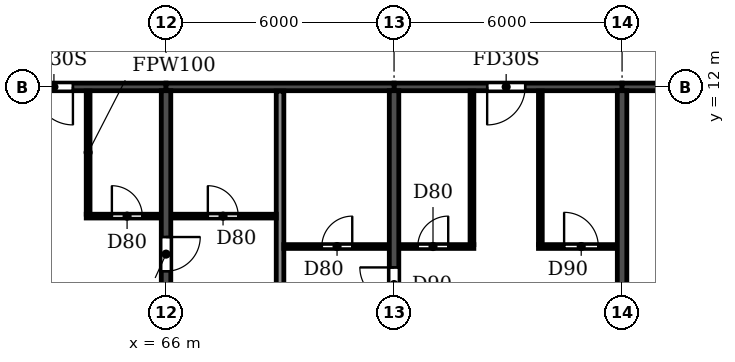
"""IFC4 building model, lengths in metres.
Left out: names, types, materials, properties, quantities, classifications, styles, units other than length and angle.
Written with IfcOpenShell. Run it as: python <this file> out.ifc"""

import sys

from ifc_helpers import new_model, si_unit, direction, frame, frame_2d, origin, place, context, subcontext, project, spatial, rectangle, extrude, element, fill, save


model = new_model("IFC4")
c1 = context("Model", 3, precision=1e-05, world=origin(), true_north=direction((0.0, 1.0)))
c2 = subcontext(c1, "Body", "Model", "MODEL_VIEW")
j1 = project(units=[si_unit("LENGTHUNIT", "METRE"), si_unit("PLANEANGLEUNIT", "RADIAN")], contexts=[c1])
p1 = place(None, origin())
s1 = spatial("IfcSite", under=j1, at=p1, CompositionType="ELEMENT")
p2 = place(p1, origin())
s2 = spatial("IfcBuilding", under=s1, at=p2, CompositionType="ELEMENT")
p3 = place(p2, frame((0.0, 0.0, 191.7)))
s3 = spatial("IfcBuildingStorey", under=s2, at=p3, CompositionType="ELEMENT", Elevation=191.7)
p4 = place(p3, frame((66.0, 0.2, 0.0), z_axis=(0.0, 0.0, 1.0), x_axis=(0.0, 1.0, 0.0)))
e1 = element("IfcWall", 1, at=p4, inside=s3, PredefinedType="SHEAR", context=c2, shape_type="SweptSolid", body=[
    extrude(rectangle(XDim=11.7, YDim=0.25, at=frame_2d((5.85, 0.0))), origin(), (0.0, 0.0, 1.0), 3.08),
])
p5 = place(p4, frame((6.95, 0.0, 0.0)))
e2 = element("IfcOpeningElement", 2, at=p5, cuts=e1, PredefinedType="OPENING", context=c2, shape_type="SweptSolid", body=[
    extrude(rectangle(XDim=0.9, YDim=2.1, at=frame_2d((0.45, 1.05))), frame((0.0, 0.135, 0.0), z_axis=(0.0, -1.0, 0.0), x_axis=(1.0, 0.0, 0.0)), (0.0, 0.0, 1.0), 0.27),
])
p6 = place(p3, frame((72.0, 0.2, 0.0), z_axis=(0.0, 0.0, 1.0), x_axis=(0.0, 1.0, 0.0)))
e3 = element("IfcWall", 3, at=p6, inside=s3, PredefinedType="SHEAR", context=c2, shape_type="SweptSolid", body=[
    extrude(rectangle(XDim=11.7, YDim=0.25, at=frame_2d((5.85, 0.0))), origin(), (0.0, 0.0, 1.0), 3.08),
])
p7 = place(p6, frame((6.15, 0.0, 0.0)))
e4 = element("IfcOpeningElement", 4, at=p7, cuts=e3, PredefinedType="OPENING", context=c2, shape_type="SweptSolid", body=[
    extrude(rectangle(XDim=0.9, YDim=2.1, at=frame_2d((0.45, 1.05))), frame((0.0, 0.135, 0.0), z_axis=(0.0, -1.0, 0.0), x_axis=(1.0, 0.0, 0.0)), (0.0, 0.0, 1.0), 0.27),
])
p8 = place(p3, frame((78.0, 0.2, 0.0), z_axis=(0.0, 0.0, 1.0), x_axis=(0.0, 1.0, 0.0)))
e5 = element("IfcWall", 5, at=p8, inside=s3, PredefinedType="SHEAR", context=c2, shape_type="SweptSolid", body=[
    extrude(rectangle(XDim=11.7, YDim=0.25, at=frame_2d((5.85, 0.0))), origin(), (0.0, 0.0, 1.0), 3.08),
])
p9 = place(p3, frame((60.0, 12.0, 0.0), z_axis=(0.0, 0.0, 1.0), x_axis=(1.0, 0.0, 0.0)))
e6 = element("IfcWall", 6, at=p9, inside=s3, PredefinedType="SHEAR", context=c2, shape_type="SweptSolid", body=[
    extrude(rectangle(XDim=6.0, YDim=0.2, at=frame_2d((3.0, 0.0))), origin(), (0.0, 0.0, 1.0), 2.48),
])
p10 = place(p9, frame((2.55, 0.0, 0.0)))
e7 = element("IfcOpeningElement", 7, at=p10, cuts=e6, PredefinedType="OPENING", context=c2, shape_type="SweptSolid", body=[
    extrude(rectangle(XDim=1.0, YDim=2.1, at=frame_2d((0.5, 1.05))), frame((0.0, 0.11, 0.0), z_axis=(0.0, -1.0, 0.0), x_axis=(1.0, 0.0, 0.0)), (0.0, 0.0, 1.0), 0.22),
])
p11 = place(p3, frame((66.0, 12.0, 0.0), z_axis=(0.0, 0.0, 1.0), x_axis=(1.0, 0.0, 0.0)))
e8 = element("IfcWall", 8, at=p11, inside=s3, PredefinedType="SHEAR", context=c2, shape_type="SweptSolid", body=[
    extrude(rectangle(XDim=6.0, YDim=0.2, at=frame_2d((3.0, 0.0))), origin(), (0.0, 0.0, 1.0), 2.48),
])
p12 = place(p3, frame((72.0, 12.0, 0.0), z_axis=(0.0, 0.0, 1.0), x_axis=(1.0, 0.0, 0.0)))
e9 = element("IfcWall", 9, at=p12, inside=s3, PredefinedType="SHEAR", context=c2, shape_type="SweptSolid", body=[
    extrude(rectangle(XDim=6.0, YDim=0.2, at=frame_2d((3.0, 0.0))), origin(), (0.0, 0.0, 1.0), 2.48),
])
p13 = place(p12, frame((2.45, 0.0, 0.0)))
e10 = element("IfcOpeningElement", 10, at=p13, cuts=e9, PredefinedType="OPENING", context=c2, shape_type="SweptSolid", body=[
    extrude(rectangle(XDim=1.0, YDim=2.1, at=frame_2d((0.5, 1.05))), frame((0.0, 0.11, 0.0), z_axis=(0.0, -1.0, 0.0), x_axis=(1.0, 0.0, 0.0)), (0.0, 0.0, 1.0), 0.22),
])
p14 = place(p3, frame((78.0, 12.0, 0.0), z_axis=(0.0, 0.0, 1.0), x_axis=(1.0, 0.0, 0.0)))
e11 = element("IfcWall", 11, at=p14, inside=s3, PredefinedType="SHEAR", context=c2, shape_type="SweptSolid", body=[
    extrude(rectangle(XDim=5.8, YDim=0.2, at=frame_2d((2.9, 0.0))), origin(), (0.0, 0.0, 1.0), 2.48),
])
p15 = place(p14, frame((2.5, 0.0, 0.0)))
e12 = element("IfcOpeningElement", 12, at=p15, cuts=e11, PredefinedType="OPENING", context=c2, shape_type="SweptSolid", body=[
    extrude(rectangle(XDim=1.0, YDim=2.1, at=frame_2d((0.5, 1.05))), frame((0.0, 0.11, 0.0), z_axis=(0.0, -1.0, 0.0), x_axis=(1.0, 0.0, 0.0)), (0.0, 0.0, 1.0), 0.22),
])
p16 = place(p3, frame((69.0, 0.06, 0.0), z_axis=(0.0, 0.0, 1.0), x_axis=(0.0, 1.0, 0.0)))
e13 = element("IfcWall", 13, at=p16, inside=s3, PredefinedType="PARTITIONING", context=c2, shape_type="SweptSolid", body=[
    extrude(rectangle(XDim=11.83, YDim=0.2, at=frame_2d((5.915, 0.0))), origin(), (0.0, 0.0, 1.0), 3.08),
])
p17 = place(p3, frame((69.1, 7.8, 0.0), z_axis=(0.0, 0.0, 1.0), x_axis=(1.0, 0.0, 0.0)))
e14 = element("IfcWall", 14, at=p17, inside=s3, PredefinedType="PARTITIONING", context=c2, shape_type="SweptSolid", body=[
    extrude(rectangle(XDim=2.765, YDim=0.1, at=frame_2d((1.382, 0.0))), origin(), (0.0, 0.0, 1.0), 3.08),
])
p18 = place(p17, frame((1.0, 0.0, 0.0)))
e15 = element("IfcOpeningElement", 15, at=p18, cuts=e14, PredefinedType="OPENING", context=c2, shape_type="SweptSolid", body=[
    extrude(rectangle(XDim=0.8, YDim=2.1, at=frame_2d((0.4, 1.05))), frame((0.0, 0.06, 0.0), z_axis=(0.0, -1.0, 0.0), x_axis=(1.0, 0.0, 0.0)), (0.0, 0.0, 1.0), 0.12),
])
p19 = place(p3, frame((72.135, 7.8, 0.0), z_axis=(0.0, 0.0, 1.0), x_axis=(1.0, 0.0, 0.0)))
e16 = element("IfcWall", 16, at=p19, inside=s3, PredefinedType="PARTITIONING", context=c2, shape_type="SweptSolid", body=[
    extrude(rectangle(XDim=1.965, YDim=0.1, at=frame_2d((0.982, 0.0))), origin(), (0.0, 0.0, 1.0), 3.08),
])
p20 = place(p19, frame((0.49, 0.0, 0.0)))
e17 = element("IfcOpeningElement", 17, at=p20, cuts=e16, PredefinedType="OPENING", context=c2, shape_type="SweptSolid", body=[
    extrude(rectangle(XDim=0.8, YDim=2.1, at=frame_2d((0.4, 1.05))), frame((0.0, 0.06, 0.0), z_axis=(0.0, -1.0, 0.0), x_axis=(1.0, 0.0, 0.0)), (0.0, 0.0, 1.0), 0.12),
])
p21 = place(p3, frame((75.8, 7.8, 0.0), z_axis=(0.0, 0.0, 1.0), x_axis=(1.0, 0.0, 0.0)))
e18 = element("IfcWall", 18, at=p21, inside=s3, PredefinedType="PARTITIONING", context=c2, shape_type="SweptSolid", body=[
    extrude(rectangle(XDim=2.065, YDim=0.1, at=frame_2d((1.032, 0.0))), origin(), (0.0, 0.0, 1.0), 3.08),
])
p22 = place(p21, frame((0.675, 0.0, 0.0)))
e19 = element("IfcOpeningElement", 19, at=p22, cuts=e18, PredefinedType="OPENING", context=c2, shape_type="SweptSolid", body=[
    extrude(rectangle(XDim=0.9, YDim=2.1, at=frame_2d((0.45, 1.05))), frame((0.0, 0.06, 0.0), z_axis=(0.0, -1.0, 0.0), x_axis=(1.0, 0.0, 0.0)), (0.0, 0.0, 1.0), 0.12),
])
p23 = place(p3, frame((63.9, 8.6, 0.0), z_axis=(0.0, 0.0, 1.0), x_axis=(1.0, 0.0, 0.0)))
e20 = element("IfcWall", 20, at=p23, inside=s3, PredefinedType="PARTITIONING", context=c2, shape_type="SweptSolid", body=[
    extrude(rectangle(XDim=1.965, YDim=0.1, at=frame_2d((0.982, 0.0))), origin(), (0.0, 0.0, 1.0), 3.08),
])
p24 = place(p23, frame((0.675, 0.0, 0.0)))
e21 = element("IfcOpeningElement", 21, at=p24, cuts=e20, PredefinedType="OPENING", context=c2, shape_type="SweptSolid", body=[
    extrude(rectangle(XDim=0.8, YDim=2.1, at=frame_2d((0.4, 1.05))), frame((0.0, 0.06, 0.0), z_axis=(0.0, -1.0, 0.0), x_axis=(1.0, 0.0, 0.0)), (0.0, 0.0, 1.0), 0.12),
])
p25 = place(p3, frame((66.135, 8.6, 0.0), z_axis=(0.0, 0.0, 1.0), x_axis=(1.0, 0.0, 0.0)))
e22 = element("IfcWall", 22, at=p25, inside=s3, PredefinedType="PARTITIONING", context=c2, shape_type="SweptSolid", body=[
    extrude(rectangle(XDim=2.765, YDim=0.1, at=frame_2d((1.382, 0.0))), origin(), (0.0, 0.0, 1.0), 3.08),
])
p26 = place(p25, frame((0.965, 0.0, 0.0)))
e23 = element("IfcOpeningElement", 23, at=p26, cuts=e22, PredefinedType="OPENING", context=c2, shape_type="SweptSolid", body=[
    extrude(rectangle(XDim=0.8, YDim=2.1, at=frame_2d((0.4, 1.05))), frame((0.0, 0.06, 0.0), z_axis=(0.0, -1.0, 0.0), x_axis=(1.0, 0.0, 0.0)), (0.0, 0.0, 1.0), 0.12),
])
p27 = place(p3, frame((63.95, 8.65, 0.0), z_axis=(0.0, 0.0, 1.0), x_axis=(0.0, 1.0, 0.0)))
e24 = element("IfcWall", 24, at=p27, inside=s3, PredefinedType="PARTITIONING", context=c2, shape_type="SweptSolid", body=[
    extrude(rectangle(XDim=3.24, YDim=0.1, at=frame_2d((1.62, 0.0))), origin(), (0.0, 0.0, 1.0), 3.08),
])
for number, where, z_axis, x_axis in (
    (25, (74.05, 7.85, 0.0), (0.0, 0.0, 1.0), (0.0, 1.0, 0.0)),
    (26, (75.85, 7.85, 0.0), (0.0, 0.0, 1.0), (0.0, 1.0, 0.0)),
):
    element("IfcWall", number, at=place(p3, frame(where, z_axis=z_axis, x_axis=x_axis)), inside=s3, PredefinedType="PARTITIONING", context=c2, shape_type="SweptSolid", body=[
        extrude(rectangle(XDim=4.04, YDim=0.1, at=frame_2d((2.02, 0.0))), origin(), (0.0, 0.0, 1.0), 3.08),
    ])
p28 = place(p26, origin())
e27 = element("IfcDoor", 27, at=p28, inside=s3, OperationType="SINGLE_SWING_LEFT", PredefinedType="DOOR", context=c2, shape_type="SweptSolid", body=[
    extrude(rectangle(XDim=0.8, YDim=2.1, at=frame_2d((0.4, 1.05))), frame((0.0, 0.025, 0.0), z_axis=(0.0, -1.0, 0.0), x_axis=(1.0, 0.0, 0.0)), (0.0, 0.0, 1.0), 0.05),
])
fill(e23, e27)
p29 = place(p10, frame((1.0, 0.0, 0.0), z_axis=(0.0, 0.0, 1.0), x_axis=(-1.0, 0.0, 0.0)))
e28 = element("IfcDoor", 28, at=p29, inside=s3, OperationType="SINGLE_SWING_LEFT", PredefinedType="DOOR", context=c2, shape_type="SweptSolid", body=[
    extrude(rectangle(XDim=1.0, YDim=2.1, at=frame_2d((0.5, 1.05))), frame((0.0, 0.025, 0.0), z_axis=(0.0, -1.0, 0.0), x_axis=(1.0, 0.0, 0.0)), (0.0, 0.0, 1.0), 0.05),
])
fill(e7, e28)
p30 = place(p24, origin())
e29 = element("IfcDoor", 29, at=p30, inside=s3, OperationType="SINGLE_SWING_LEFT", PredefinedType="DOOR", context=c2, shape_type="SweptSolid", body=[
    extrude(rectangle(XDim=0.8, YDim=2.1, at=frame_2d((0.4, 1.05))), frame((0.0, 0.025, 0.0), z_axis=(0.0, -1.0, 0.0), x_axis=(1.0, 0.0, 0.0)), (0.0, 0.0, 1.0), 0.05),
])
fill(e21, e29)
p31 = place(p5, frame((0.9, 0.0, 0.0), z_axis=(0.0, 0.0, 1.0), x_axis=(-1.0, 0.0, 0.0)))
e30 = element("IfcDoor", 30, at=p31, inside=s3, OperationType="SINGLE_SWING_LEFT", PredefinedType="DOOR", context=c2, shape_type="SweptSolid", body=[
    extrude(rectangle(XDim=0.9, YDim=2.1, at=frame_2d((0.45, 1.05))), frame((0.0, 0.025, 0.0), z_axis=(0.0, -1.0, 0.0), x_axis=(1.0, 0.0, 0.0)), (0.0, 0.0, 1.0), 0.05),
])
fill(e2, e30)
p32 = place(p18, origin())
e31 = element("IfcDoor", 31, at=p32, inside=s3, OperationType="SINGLE_SWING_RIGHT", PredefinedType="DOOR", context=c2, shape_type="SweptSolid", body=[
    extrude(rectangle(XDim=0.8, YDim=2.1, at=frame_2d((0.4, 1.05))), frame((0.0, 0.025, 0.0), z_axis=(0.0, -1.0, 0.0), x_axis=(1.0, 0.0, 0.0)), (0.0, 0.0, 1.0), 0.05),
])
fill(e15, e31)
p33 = place(p7, origin())
e32 = element("IfcDoor", 32, at=p33, inside=s3, OperationType="SINGLE_SWING_RIGHT", PredefinedType="DOOR", context=c2, shape_type="SweptSolid", body=[
    extrude(rectangle(XDim=0.9, YDim=2.1, at=frame_2d((0.45, 1.05))), frame((0.0, 0.025, 0.0), z_axis=(0.0, -1.0, 0.0), x_axis=(1.0, 0.0, 0.0)), (0.0, 0.0, 1.0), 0.05),
])
fill(e4, e32)
p34 = place(p20, origin())
e33 = element("IfcDoor", 33, at=p34, inside=s3, OperationType="SINGLE_SWING_RIGHT", PredefinedType="DOOR", context=c2, shape_type="SweptSolid", body=[
    extrude(rectangle(XDim=0.8, YDim=2.1, at=frame_2d((0.4, 1.05))), frame((0.0, 0.025, 0.0), z_axis=(0.0, -1.0, 0.0), x_axis=(1.0, 0.0, 0.0)), (0.0, 0.0, 1.0), 0.05),
])
fill(e17, e33)
p35 = place(p13, frame((1.0, 0.0, 0.0), z_axis=(0.0, 0.0, 1.0), x_axis=(-1.0, 0.0, 0.0)))
e34 = element("IfcDoor", 34, at=p35, inside=s3, OperationType="SINGLE_SWING_RIGHT", PredefinedType="DOOR", context=c2, shape_type="SweptSolid", body=[
    extrude(rectangle(XDim=1.0, YDim=2.1, at=frame_2d((0.5, 1.05))), frame((0.0, 0.025, 0.0), z_axis=(0.0, -1.0, 0.0), x_axis=(1.0, 0.0, 0.0)), (0.0, 0.0, 1.0), 0.05),
])
fill(e10, e34)
p36 = place(p22, origin())
e35 = element("IfcDoor", 35, at=p36, inside=s3, OperationType="SINGLE_SWING_LEFT", PredefinedType="DOOR", context=c2, shape_type="SweptSolid", body=[
    extrude(rectangle(XDim=0.9, YDim=2.1, at=frame_2d((0.45, 1.05))), frame((0.0, 0.025, 0.0), z_axis=(0.0, -1.0, 0.0), x_axis=(1.0, 0.0, 0.0)), (0.0, 0.0, 1.0), 0.05),
])
fill(e19, e35)
save(model, sys.argv[1])
